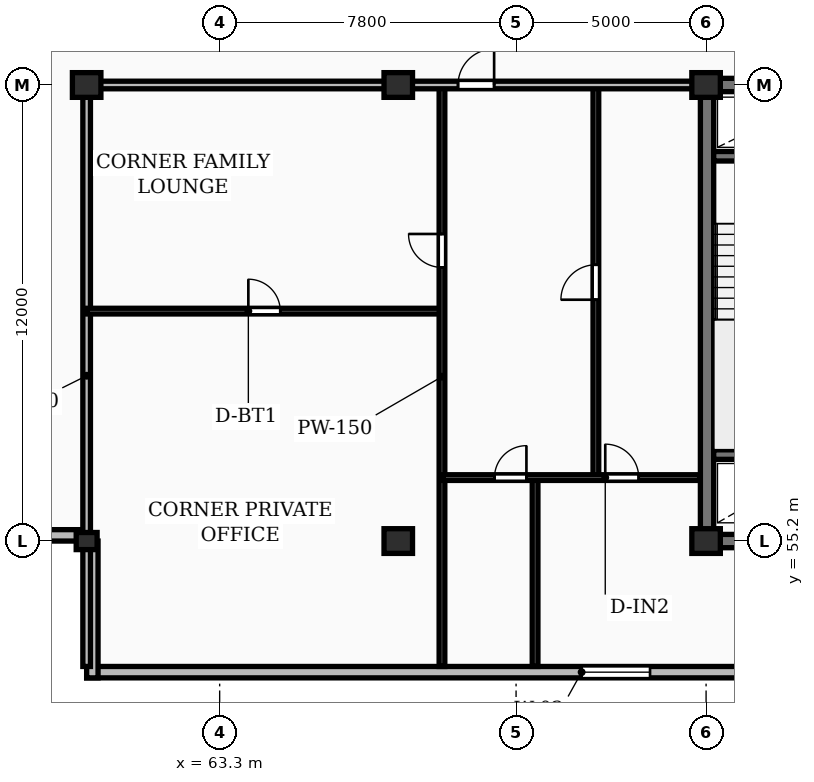
"""IFC4 building model, lengths in metres.
Left out: names, types, materials, properties, quantities, classifications, styles, units other than length and angle.
Written with IfcOpenShell. Run it as: python <this file> out.ifc"""

import sys

from ifc_helpers import new_model, si_unit, direction, frame, frame_2d, origin, origin_2d, place, context, subcontext, project, spatial, rectangle, extrude, element, fill, save


model = new_model("IFC4")
c1 = context("Model", 3, precision=1e-05, world=origin(), true_north=direction((0.0, 1.0)))
c2 = subcontext(c1, "Body", "Model", "MODEL_VIEW")
j1 = project(units=[si_unit("LENGTHUNIT", "METRE"), si_unit("PLANEANGLEUNIT", "RADIAN")], contexts=[c1])
p1 = place(None, origin())
s1 = spatial("IfcSite", under=j1, at=p1, CompositionType="ELEMENT")
p2 = place(p1, origin())
s2 = spatial("IfcBuilding", under=s1, at=p2, CompositionType="ELEMENT")
p3 = place(p2, frame((0.0, 0.0, 256.25)))
s3 = spatial("IfcBuildingStorey", under=s2, at=p3, CompositionType="ELEMENT", Elevation=256.25)
p4 = place(p3, frame((59.8, 55.2, 0.0), z_axis=(0.0, 0.0, 1.0), x_axis=(1.0, 0.0, 0.0)))
e1 = element("IfcColumn", 1, at=p4, inside=s3, PredefinedType="PILASTER", context=c2, shape_type="SweptSolid", body=[
    extrude(rectangle(XDim=0.55, YDim=0.45, at=origin_2d()), origin(), (0.0, 0.0, 1.0), 3.45),
])
for number, where, z_axis, x_axis in (
    (2, (59.8, 67.2, 0.0), (0.0, 0.0, 1.0), (1.0, 0.0, 0.0)),
    (3, (68.0, 55.2, 0.0), (0.0, 0.0, 1.0), (1.0, 0.0, 0.0)),
    (4, (68.0, 67.2, 0.0), (0.0, 0.0, 1.0), (1.0, 0.0, 0.0)),
    (5, (76.1, 55.2, 0.0), (0.0, 0.0, 1.0), (1.0, 0.0, 0.0)),
    (6, (76.1, 67.2, 0.0), (0.0, 0.0, 1.0), (1.0, 0.0, 0.0)),
):
    element("IfcColumn", number, at=place(p3, frame(where, z_axis=z_axis, x_axis=x_axis)), inside=s3, PredefinedType="COLUMN", context=c2, shape_type="SweptSolid", body=[
        extrude(rectangle(XDim=0.75, YDim=0.65, at=origin_2d()), origin(), (0.0, 0.0, 1.0), 3.45),
    ])
p5 = place(p3, frame((59.8, 51.75, 0.0), z_axis=(0.0, 0.0, 1.0), x_axis=(1.0, 0.0, 0.0)))
e7 = element("IfcWall", 7, at=p5, inside=s3, PredefinedType="STANDARD", context=c2, shape_type="SweptSolid", body=[
    extrude(rectangle(XDim=68.6, YDim=0.3, at=frame_2d((34.3, 0.0))), origin(), (0.0, 0.0, 1.0), 3.17),
])
p6 = place(p5, frame((13.025, 0.0, 0.85)))
e8 = element("IfcOpeningElement", 8, at=p6, cuts=e7, PredefinedType="OPENING", context=c2, shape_type="SweptSolid", body=[
    extrude(rectangle(XDim=1.8, YDim=1.8, at=frame_2d((0.9, 0.9))), frame((0.0, 0.16, 0.0), z_axis=(0.0, -1.0, 0.0), x_axis=(1.0, 0.0, 0.0)), (0.0, 0.0, 1.0), 0.32),
])
p7 = place(p5, frame((56.375, 0.0, 0.85)))
e9 = element("IfcOpeningElement", 9, at=p7, cuts=e7, PredefinedType="OPENING", context=c2, shape_type="SweptSolid", body=[
    extrude(rectangle(XDim=1.8, YDim=1.8, at=frame_2d((0.9, 0.9))), frame((0.0, 0.16, 0.0), z_axis=(0.0, -1.0, 0.0), x_axis=(1.0, 0.0, 0.0)), (0.0, 0.0, 1.0), 0.32),
])
p8 = place(p3, frame((56.2, 55.35, 0.0), z_axis=(0.0, 0.0, 1.0), x_axis=(1.0, 0.0, 0.0)))
e10 = element("IfcWall", 10, at=p8, inside=s3, PredefinedType="STANDARD", context=c2, shape_type="SweptSolid", body=[
    extrude(rectangle(XDim=3.6, YDim=0.3, at=frame_2d((1.8, 0.0))), origin(), (0.0, 0.0, 1.0), 3.17),
])
p9 = place(p3, frame((59.95, 55.2, 0.0), z_axis=(0.0, 0.0, 1.0), x_axis=(0.0, -1.0, 0.0)))
e11 = element("IfcWall", 11, at=p9, inside=s3, PredefinedType="STANDARD", context=c2, shape_type="SweptSolid", body=[
    extrude(rectangle(XDim=3.6, YDim=0.3, at=frame_2d((1.8, 0.0))), origin(), (0.0, 0.0, 1.0), 3.17),
])
p10 = place(p3, frame((75.95, 55.2, 0.0), z_axis=(0.0, 0.0, 1.0), x_axis=(1.0, 0.0, 0.0)))
e12 = element("IfcWall", 12, at=p10, inside=s3, PredefinedType="SHEAR", context=c2, shape_type="SweptSolid", body=[
    extrude(rectangle(XDim=36.3, YDim=0.35, at=frame_2d((18.15, 0.0))), origin(), (0.0, 0.0, 1.0), 3.45),
])
p11 = place(p3, frame((76.125, 55.375, 0.0), z_axis=(0.0, 0.0, 1.0), x_axis=(0.0, 1.0, 0.0)))
e13 = element("IfcWall", 13, at=p11, inside=s3, PredefinedType="SHEAR", context=c2, shape_type="SweptSolid", body=[
    extrude(rectangle(XDim=11.65, YDim=0.35, at=frame_2d((5.825, 0.0))), origin(), (0.0, 0.0, 1.0), 3.45),
])
p12 = place(p3, frame((75.95, 67.2, 0.0), z_axis=(0.0, 0.0, 1.0), x_axis=(1.0, 0.0, 0.0)))
e14 = element("IfcWall", 14, at=p12, inside=s3, PredefinedType="SHEAR", context=c2, shape_type="SweptSolid", body=[
    extrude(rectangle(XDim=36.3, YDim=0.35, at=frame_2d((18.15, 0.0))), origin(), (0.0, 0.0, 1.0), 3.45),
])
p13 = place(p12, frame((5.25, 0.0, 0.0)))
e15 = element("IfcOpeningElement", 15, at=p13, cuts=e14, PredefinedType="OPENING", context=c2, shape_type="SweptSolid", body=[
    extrude(rectangle(XDim=1.0, YDim=2.15, at=frame_2d((0.5, 1.075))), frame((0.0, 0.185, 0.0), z_axis=(0.0, -1.0, 0.0), x_axis=(1.0, 0.0, 0.0)), (0.0, 0.0, 1.0), 0.37),
])
p14 = place(p12, frame((21.6, 0.0, 0.0)))
e16 = element("IfcOpeningElement", 16, at=p14, cuts=e14, PredefinedType="OPENING", context=c2, shape_type="SweptSolid", body=[
    extrude(rectangle(XDim=1.5, YDim=2.2, at=frame_2d((0.75, 1.1))), frame((0.0, 0.185, 0.0), z_axis=(0.0, -1.0, 0.0), x_axis=(1.0, 0.0, 0.0)), (0.0, 0.0, 1.0), 0.37),
])
p15 = place(p12, frame((30.45, 0.0, 0.0)))
e17 = element("IfcOpeningElement", 17, at=p15, cuts=e14, PredefinedType="OPENING", context=c2, shape_type="SweptSolid", body=[
    extrude(rectangle(XDim=1.0, YDim=2.15, at=frame_2d((0.5, 1.075))), frame((0.0, 0.185, 0.0), z_axis=(0.0, -1.0, 0.0), x_axis=(1.0, 0.0, 0.0)), (0.0, 0.0, 1.0), 0.37),
])
for number, where, z_axis, x_axis in (
    (18, (76.3, 57.475, 0.0), (0.0, 0.0, 1.0), (1.0, 0.0, 0.0)),
    (19, (76.3, 65.325, 0.0), (0.0, 0.0, 1.0), (1.0, 0.0, 0.0)),
):
    element("IfcWall", number, at=place(p3, frame(where, z_axis=z_axis, x_axis=x_axis)), inside=s3, PredefinedType="SHEAR", context=c2, shape_type="SweptSolid", body=[
        extrude(rectangle(XDim=3.24, YDim=0.25, at=frame_2d((1.62, 0.0))), origin(), (0.0, 0.0, 1.0), 3.45),
    ])
p16 = place(p3, frame((59.8, 51.9, 0.0), z_axis=(0.0, 0.0, 1.0), x_axis=(0.0, 1.0, 0.0)))
e20 = element("IfcWall", 20, at=p16, inside=s3, PredefinedType="PARTITIONING", context=c2, shape_type="SweptSolid", body=[
    extrude(rectangle(XDim=15.3, YDim=0.2, at=frame_2d((7.65, 0.0))), origin(), (0.0, 0.0, 1.0), 2.477),
])
p17 = place(p3, frame((59.8, 61.25, 0.0), z_axis=(0.0, 0.0, 1.0), x_axis=(1.0, 0.0, 0.0)))
e21 = element("IfcWall", 21, at=p17, inside=s3, PredefinedType="PARTITIONING", context=c2, shape_type="SweptSolid", body=[
    extrude(rectangle(XDim=9.35, YDim=0.15, at=frame_2d((4.675, 0.0))), origin(), (0.0, 0.0, 1.0), 3.17),
])
p18 = place(p17, frame((4.255, 0.0, 0.0)))
e22 = element("IfcOpeningElement", 22, at=p18, cuts=e21, PredefinedType="OPENING", context=c2, shape_type="SweptSolid", body=[
    extrude(rectangle(XDim=0.84, YDim=2.04, at=frame_2d((0.42, 1.02))), frame((0.0, 0.085, 0.0), z_axis=(0.0, -1.0, 0.0), x_axis=(1.0, 0.0, 0.0)), (0.0, 0.0, 1.0), 0.17),
])
p19 = place(p3, frame((69.15, 51.9, 0.0), z_axis=(0.0, 0.0, 1.0), x_axis=(0.0, 1.0, 0.0)))
e23 = element("IfcWall", 23, at=p19, inside=s3, PredefinedType="PARTITIONING", context=c2, shape_type="SweptSolid", body=[
    extrude(rectangle(XDim=15.25, YDim=0.15, at=frame_2d((7.625, 0.0))), origin(), (0.0, 0.0, 1.0), 3.17),
])
p20 = place(p19, frame((10.5, 0.0, 0.0)))
e24 = element("IfcOpeningElement", 24, at=p20, cuts=e23, PredefinedType="OPENING", context=c2, shape_type="SweptSolid", body=[
    extrude(rectangle(XDim=0.88, YDim=2.06, at=frame_2d((0.44, 1.03))), frame((0.0, 0.085, 0.0), z_axis=(0.0, -1.0, 0.0), x_axis=(1.0, 0.0, 0.0)), (0.0, 0.0, 1.0), 0.17),
])
p21 = place(p3, frame((73.2, 56.87, 0.0), z_axis=(0.0, 0.0, 1.0), x_axis=(0.0, 1.0, 0.0)))
e25 = element("IfcWall", 25, at=p21, inside=s3, PredefinedType="PARTITIONING", context=c2, shape_type="SweptSolid", body=[
    extrude(rectangle(XDim=10.28, YDim=0.15, at=frame_2d((5.14, 0.0))), origin(), (0.0, 0.0, 1.0), 3.17),
])
p22 = place(p21, frame((4.68, 0.0, 0.0)))
e26 = element("IfcOpeningElement", 26, at=p22, cuts=e25, PredefinedType="OPENING", context=c2, shape_type="SweptSolid", body=[
    extrude(rectangle(XDim=0.92, YDim=2.08, at=frame_2d((0.46, 1.04))), frame((0.0, 0.085, 0.0), z_axis=(0.0, -1.0, 0.0), x_axis=(1.0, 0.0, 0.0)), (0.0, 0.0, 1.0), 0.17),
])
p23 = place(p3, frame((71.6, 51.9, 0.0), z_axis=(0.0, 0.0, 1.0), x_axis=(0.0, 1.0, 0.0)))
e27 = element("IfcWall", 27, at=p23, inside=s3, PredefinedType="PARTITIONING", context=c2, shape_type="SweptSolid", body=[
    extrude(rectangle(XDim=4.97, YDim=0.15, at=frame_2d((2.485, 0.0))), origin(), (0.0, 0.0, 1.0), 3.17),
])
p24 = place(p3, frame((69.17, 56.87, 0.0), z_axis=(0.0, 0.0, 1.0), x_axis=(1.0, 0.0, 0.0)))
e28 = element("IfcWall", 28, at=p24, inside=s3, PredefinedType="PARTITIONING", context=c2, shape_type="SweptSolid", body=[
    extrude(rectangle(XDim=6.76, YDim=0.15, at=frame_2d((3.38, 0.0))), origin(), (0.0, 0.0, 1.0), 3.17),
])
p25 = place(p24, frame((1.362, 0.0, 0.0)))
e29 = element("IfcOpeningElement", 29, at=p25, cuts=e28, PredefinedType="OPENING", context=c2, shape_type="SweptSolid", body=[
    extrude(rectangle(XDim=0.84, YDim=2.04, at=frame_2d((0.42, 1.02))), frame((0.0, 0.085, 0.0), z_axis=(0.0, -1.0, 0.0), x_axis=(1.0, 0.0, 0.0)), (0.0, 0.0, 1.0), 0.17),
])
p26 = place(p24, frame((4.277, 0.0, 0.0)))
e30 = element("IfcOpeningElement", 30, at=p26, cuts=e28, PredefinedType="OPENING", context=c2, shape_type="SweptSolid", body=[
    extrude(rectangle(XDim=0.88, YDim=2.06, at=frame_2d((0.44, 1.03))), frame((0.0, 0.085, 0.0), z_axis=(0.0, -1.0, 0.0), x_axis=(1.0, 0.0, 0.0)), (0.0, 0.0, 1.0), 0.17),
])
p27 = place(p3, frame((59.8, 67.2, 0.0), z_axis=(0.0, 0.0, 1.0), x_axis=(1.0, 0.0, 0.0)))
e31 = element("IfcWall", 31, at=p27, inside=s3, PredefinedType="PARTITIONING", context=c2, shape_type="SweptSolid", body=[
    extrude(rectangle(XDim=16.15, YDim=0.2, at=frame_2d((8.075, 0.0))), origin(), (0.0, 0.0, 1.0), 2.633),
])
p28 = place(p27, frame((9.772, 0.0, 0.0)))
e32 = element("IfcOpeningElement", 32, at=p28, cuts=e31, PredefinedType="OPENING", context=c2, shape_type="SweptSolid", body=[
    extrude(rectangle(XDim=0.95, YDim=2.15, at=frame_2d((0.475, 1.075))), frame((0.0, 0.11, 0.0), z_axis=(0.0, -1.0, 0.0), x_axis=(1.0, 0.0, 0.0)), (0.0, 0.0, 1.0), 0.22),
])
p29 = place(p6, origin())
e33 = element("IfcWindow", 33, at=p29, inside=s3, PartitioningType="SINGLE_PANEL", PredefinedType="WINDOW", context=c2, shape_type="SweptSolid", body=[
    extrude(rectangle(XDim=1.8, YDim=1.8, at=frame_2d((0.9, 0.9))), frame((0.0, 0.03, 0.0), z_axis=(0.0, -1.0, 0.0), x_axis=(1.0, 0.0, 0.0)), (0.0, 0.0, 1.0), 0.06),
])
fill(e8, e33)
p30 = place(p18, origin())
e34 = element("IfcDoor", 34, at=p30, inside=s3, OperationType="SINGLE_SWING_LEFT", PredefinedType="DOOR", context=c2, shape_type="SweptSolid", body=[
    extrude(rectangle(XDim=0.84, YDim=2.04, at=frame_2d((0.42, 1.02))), frame((0.0, 0.025, 0.0), z_axis=(0.0, -1.0, 0.0), x_axis=(1.0, 0.0, 0.0)), (0.0, 0.0, 1.0), 0.05),
])
fill(e22, e34)
p31 = place(p20, origin())
e35 = element("IfcDoor", 35, at=p31, inside=s3, OperationType="SINGLE_SWING_RIGHT", PredefinedType="DOOR", context=c2, shape_type="SweptSolid", body=[
    extrude(rectangle(XDim=0.88, YDim=2.06, at=frame_2d((0.44, 1.03))), frame((0.0, 0.025, 0.0), z_axis=(0.0, -1.0, 0.0), x_axis=(1.0, 0.0, 0.0)), (0.0, 0.0, 1.0), 0.05),
])
fill(e24, e35)
p32 = place(p22, origin())
e36 = element("IfcDoor", 36, at=p32, inside=s3, OperationType="SINGLE_SWING_LEFT", PredefinedType="DOOR", context=c2, shape_type="SweptSolid", body=[
    extrude(rectangle(XDim=0.92, YDim=2.08, at=frame_2d((0.46, 1.04))), frame((0.0, 0.025, 0.0), z_axis=(0.0, -1.0, 0.0), x_axis=(1.0, 0.0, 0.0)), (0.0, 0.0, 1.0), 0.05),
])
fill(e26, e36)
p33 = place(p25, origin())
e37 = element("IfcDoor", 37, at=p33, inside=s3, OperationType="SINGLE_SWING_RIGHT", PredefinedType="DOOR", context=c2, shape_type="SweptSolid", body=[
    extrude(rectangle(XDim=0.84, YDim=2.04, at=frame_2d((0.42, 1.02))), frame((0.0, 0.025, 0.0), z_axis=(0.0, -1.0, 0.0), x_axis=(1.0, 0.0, 0.0)), (0.0, 0.0, 1.0), 0.05),
])
fill(e29, e37)
p34 = place(p26, origin())
e38 = element("IfcDoor", 38, at=p34, inside=s3, OperationType="SINGLE_SWING_LEFT", PredefinedType="DOOR", context=c2, shape_type="SweptSolid", body=[
    extrude(rectangle(XDim=0.88, YDim=2.06, at=frame_2d((0.44, 1.03))), frame((0.0, 0.025, 0.0), z_axis=(0.0, -1.0, 0.0), x_axis=(1.0, 0.0, 0.0)), (0.0, 0.0, 1.0), 0.05),
])
fill(e30, e38)
p35 = place(p28, origin())
e39 = element("IfcDoor", 39, at=p35, inside=s3, OperationType="SINGLE_SWING_RIGHT", PredefinedType="DOOR", context=c2, shape_type="SweptSolid", body=[
    extrude(rectangle(XDim=0.95, YDim=2.15, at=frame_2d((0.475, 1.075))), frame((0.0, 0.025, 0.0), z_axis=(0.0, -1.0, 0.0), x_axis=(1.0, 0.0, 0.0)), (0.0, 0.0, 1.0), 0.05),
])
fill(e32, e39)
save(model, sys.argv[1])
